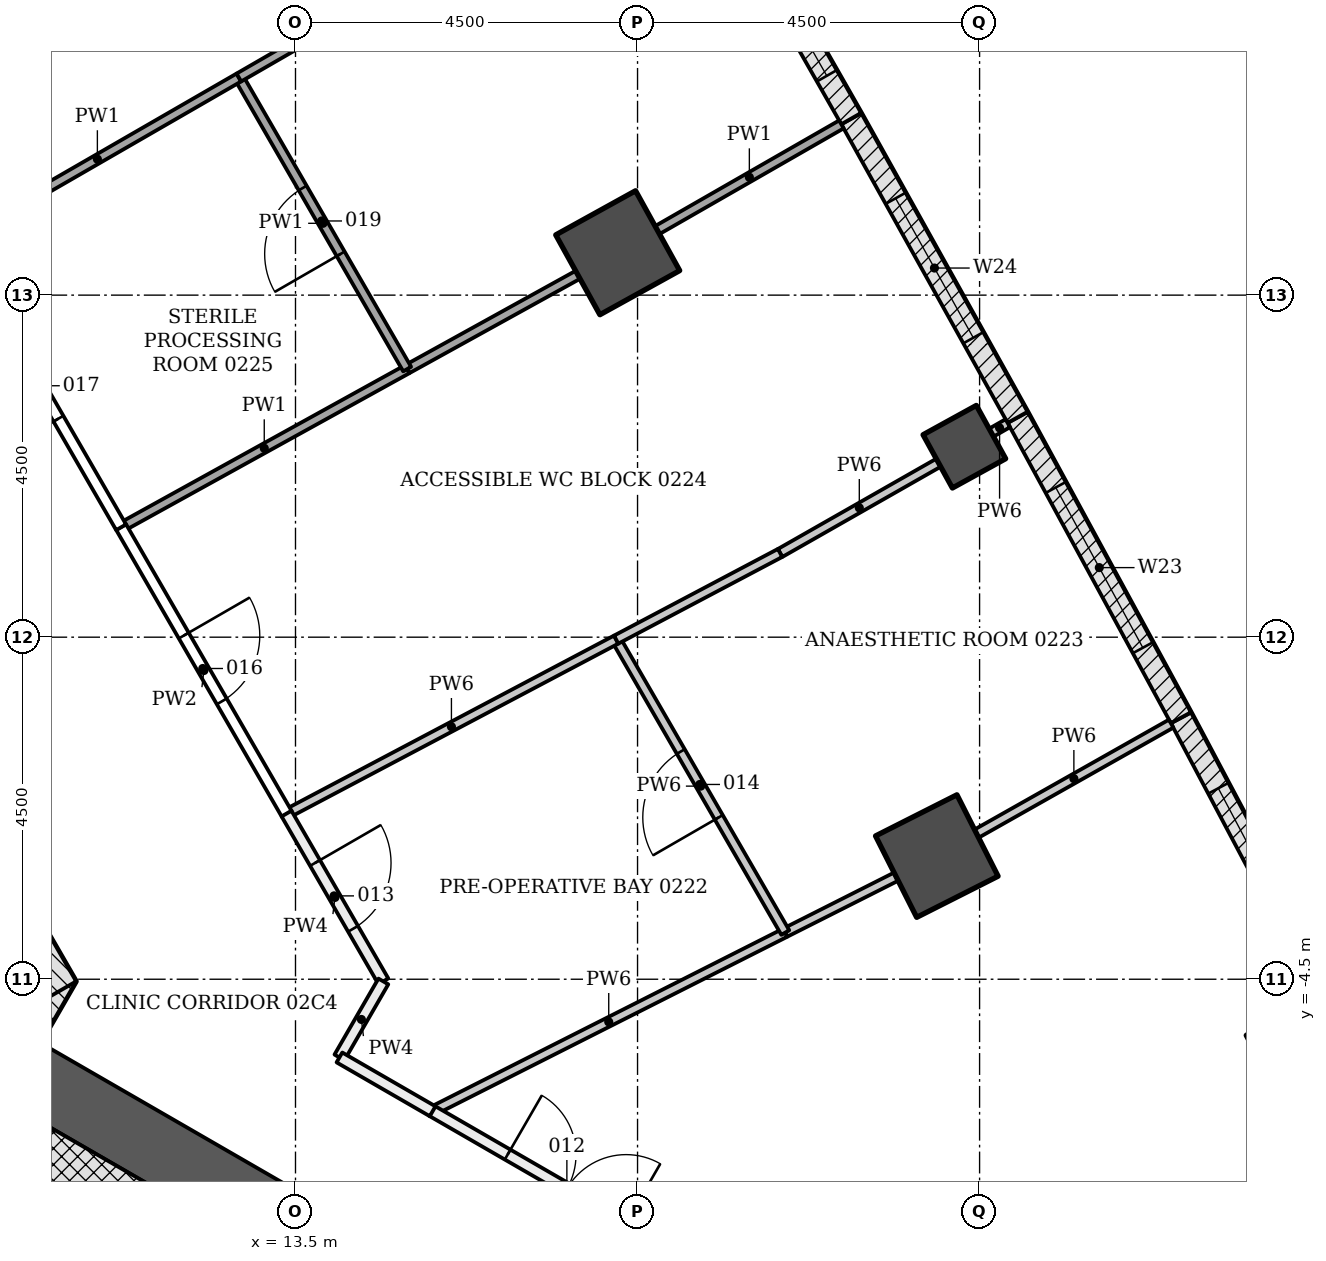
"""IFC4 building model, lengths in metres.
Left out: names, types, materials, properties, quantities, classifications, styles, units other than length and angle.
Written with IfcOpenShell. Run it as: python <this file> out.ifc"""

import sys

from ifc_helpers import new_model, si_unit, direction, frame, frame_2d, origin, origin_2d, place, context, subcontext, project, spatial, rectangle, extrude, element, fill, save


model = new_model("IFC4")
c1 = context("Model", 3, precision=1e-05, world=origin(), true_north=direction((0.0, 1.0)))
c2 = subcontext(c1, "Body", "Model", "MODEL_VIEW")
j1 = project(units=[si_unit("LENGTHUNIT", "METRE"), si_unit("PLANEANGLEUNIT", "RADIAN")], contexts=[c1])
p1 = place(None, origin())
s1 = spatial("IfcSite", under=j1, at=p1, CompositionType="ELEMENT")
p2 = place(p1, origin())
s2 = spatial("IfcBuilding", under=s1, at=p2, CompositionType="ELEMENT")
p3 = place(p2, frame((0.0, 0.0, 10.5)))
s3 = spatial("IfcBuildingStorey", under=s2, at=p3, CompositionType="ELEMENT", Elevation=10.5)
for number, where, z_axis, x_axis in (
    (1, (21.937, -2.88, -0.25), (0.0, 0.0, 1.0), (0.893, 0.451, 0.0)),
    (2, (17.739, 5.058, -0.25), (0.0, 0.0, 1.0), (0.875, 0.484, 0.0)),
):
    element("IfcColumn", number, at=place(p3, frame(where, z_axis=z_axis, x_axis=x_axis)), inside=s3, PredefinedType="COLUMN", context=c2, shape_type="SweptSolid", body=[
        extrude(rectangle(XDim=1.2, YDim=1.2, at=origin_2d()), origin(), (0.0, 0.0, 1.0), 4.5),
    ])
for number, where, z_axis, x_axis in (
    (3, (26.548, -5.406, -0.25), (0.0, 0.0, 1.0), (0.886, 0.464, 0.0)),
    (4, (22.3, 2.506, -0.25), (0.0, 0.0, 1.0), (0.876, 0.482, 0.0)),
):
    element("IfcColumn", number, at=place(p3, frame(where, z_axis=z_axis, x_axis=x_axis)), inside=s3, PredefinedType="COLUMN", context=c2, shape_type="SweptSolid", body=[
        extrude(rectangle(XDim=0.8, YDim=0.8, at=origin_2d()), origin(), (0.0, 0.0, 1.0), 4.5),
    ])
p4 = place(p3, frame((8.926, -6.753, -0.25), z_axis=(0.0, 0.0, 1.0), x_axis=(0.500042739161, 0.866000726912, 0.0)))
e5 = element("IfcWall", 5, at=p4, inside=s3, PredefinedType="SHEAR", context=c2, shape_type="SweptSolid", body=[
    extrude(rectangle(XDim=2.771, YDim=0.7, at=frame_2d((1.386, 0.0))), origin(), (0.0, 0.0, 1.0), 4.5),
])
p5 = place(p3, frame((10.311, -4.703, -0.25), z_axis=(0.0, 0.0, 1.0), x_axis=(-0.500001446645, 0.866024568562, 0.0)))
e6 = element("IfcWall", 6, at=p5, inside=s3, PredefinedType="SHEAR", context=c2, shape_type="SweptSolid", body=[
    extrude(rectangle(XDim=18.458, YDim=0.7, at=frame_2d((9.229, 0.0))), origin(), (0.0, 0.0, 1.0), 4.5),
])
p6 = place(p5, frame((8.7, 0.0, 0.25)))
e7 = element("IfcOpeningElement", 7, at=p6, cuts=e6, PredefinedType="OPENING", context=c2, shape_type="SweptSolid", body=[
    extrude(rectangle(XDim=1.0, YDim=2.1, at=frame_2d((0.5, 1.05))), frame((0.0, 0.36, 0.0), z_axis=(0.0, -1.0, 0.0), x_axis=(1.0, 0.0, 0.0)), (0.0, 0.0, 1.0), 0.72),
])
p7 = place(p5, frame((4.002, 0.0, 0.25)))
e8 = element("IfcOpeningElement", 8, at=p7, cuts=e6, PredefinedType="OPENING", context=c2, shape_type="SweptSolid", body=[
    extrude(rectangle(XDim=0.9, YDim=2.1, at=frame_2d((0.45, 1.05))), frame((0.0, 0.36, 0.0), z_axis=(0.0, -1.0, 0.0), x_axis=(1.0, 0.0, 0.0)), (0.0, 0.0, 1.0), 0.72),
])
p8 = place(p5, frame((14.093, 0.0, 0.25)))
e9 = element("IfcOpeningElement", 9, at=p8, cuts=e6, PredefinedType="OPENING", context=c2, shape_type="SweptSolid", body=[
    extrude(rectangle(XDim=0.9, YDim=2.1, at=frame_2d((0.45, 1.05))), frame((0.0, 0.36, 0.0), z_axis=(0.0, -1.0, 0.0), x_axis=(1.0, 0.0, 0.0)), (0.0, 0.0, 1.0), 0.72),
])
p9 = place(p3, frame((9.922, -5.728, -0.25), z_axis=(0.0, 0.0, 1.0), x_axis=(0.866028046028, -0.499995423472, 0.0)))
e10 = element("IfcWall", 10, at=p9, inside=s3, PredefinedType="SHEAR", context=c2, shape_type="SweptSolid", body=[
    extrude(rectangle(XDim=14.633, YDim=0.9, at=frame_2d((7.316, 0.0))), origin(), (0.0, 0.0, 1.0), 4.5),
])
p10 = place(p9, frame((7.35, 0.0, 0.25)))
e11 = element("IfcOpeningElement", 11, at=p10, cuts=e10, PredefinedType="OPENING", context=c2, shape_type="SweptSolid", body=[
    extrude(rectangle(XDim=1.5, YDim=2.1, at=frame_2d((0.75, 1.05))), frame((0.0, 0.46, 0.0), z_axis=(0.0, -1.0, 0.0), x_axis=(1.0, 0.0, 0.0)), (0.0, 0.0, 1.0), 0.92),
])
p11 = place(p3, frame((25.15, -1.062, 0.0), z_axis=(0.0, 0.0, 1.0), x_axis=(0.468566202388, -0.883428386447, 0.0)))
e12 = element("IfcWall", 12, at=p11, inside=s3, PredefinedType="NOTDEFINED", context=c2, shape_type="SweptSolid", body=[
    extrude(rectangle(XDim=4.496, YDim=0.3, at=frame_2d((2.248, 0.0))), origin(), (0.0, 0.0, 1.0), 4.25),
])
p12 = place(p11, frame((1.048, 0.0, 0.9)))
e13 = element("IfcOpeningElement", 13, at=p12, cuts=e12, PredefinedType="OPENING", context=c2, shape_type="SweptSolid", body=[
    extrude(rectangle(XDim=2.4, YDim=2.4, at=frame_2d((1.2, 1.2))), frame((0.0, 0.16, 0.0), z_axis=(0.0, -1.0, 0.0), x_axis=(1.0, 0.0, 0.0)), (0.0, 0.0, 1.0), 0.32),
])
p13 = place(p3, frame((23.001, 2.89, 0.0), z_axis=(0.0, 0.0, 1.0), x_axis=(0.477577109439, -0.878589838628, 0.0)))
e14 = element("IfcWall", 14, at=p13, inside=s3, PredefinedType="NOTDEFINED", context=c2, shape_type="SweptSolid", body=[
    extrude(rectangle(XDim=4.496, YDim=0.3, at=frame_2d((2.248, 0.0))), origin(), (0.0, 0.0, 1.0), 4.25),
])
p14 = place(p13, frame((1.048, 0.0, 0.9)))
e15 = element("IfcOpeningElement", 15, at=p14, cuts=e14, PredefinedType="OPENING", context=c2, shape_type="SweptSolid", body=[
    extrude(rectangle(XDim=2.4, YDim=2.4, at=frame_2d((1.2, 1.2))), frame((0.0, 0.16, 0.0), z_axis=(0.0, -1.0, 0.0), x_axis=(1.0, 0.0, 0.0)), (0.0, 0.0, 1.0), 0.32),
])
p15 = place(p3, frame((20.812, 6.82, 0.0), z_axis=(0.0, 0.0, 1.0), x_axis=(0.486606252415, -0.873621402617, 0.0)))
e16 = element("IfcWall", 16, at=p15, inside=s3, PredefinedType="NOTDEFINED", context=c2, shape_type="SweptSolid", body=[
    extrude(rectangle(XDim=4.496, YDim=0.3, at=frame_2d((2.248, 0.0))), origin(), (0.0, 0.0, 1.0), 4.25),
])
p16 = place(p15, frame((1.198, 0.0, 0.8)))
e17 = element("IfcOpeningElement", 17, at=p16, cuts=e16, PredefinedType="OPENING", context=c2, shape_type="SweptSolid", body=[
    extrude(rectangle(XDim=2.1, YDim=3.0, at=frame_2d((1.05, 1.5))), frame((0.0, 0.16, 0.0), z_axis=(0.0, -1.0, 0.0), x_axis=(1.0, 0.0, 0.0)), (0.0, 0.0, 1.0), 0.32),
])
p17 = place(p3, frame((18.583, 10.728, 0.0), z_axis=(0.0, 0.0, 1.0), x_axis=(0.495524760411, -0.868593812907, 0.0)))
e18 = element("IfcWall", 18, at=p17, inside=s3, PredefinedType="NOTDEFINED", context=c2, shape_type="SweptSolid", body=[
    extrude(rectangle(XDim=4.496, YDim=0.3, at=frame_2d((2.248, 0.0))), origin(), (0.0, 0.0, 1.0), 4.25),
])
p18 = place(p17, frame((0.648, 0.0, 0.8)))
e19 = element("IfcOpeningElement", 19, at=p18, cuts=e18, PredefinedType="OPENING", context=c2, shape_type="SweptSolid", body=[
    extrude(rectangle(XDim=3.2, YDim=2.7, at=frame_2d((1.6, 1.35))), frame((0.0, 0.16, 0.0), z_axis=(0.0, -1.0, 0.0), x_axis=(1.0, 0.0, 0.0)), (0.0, 0.0, 1.0), 0.32),
])
p19 = place(p3, frame((9.413, -6.61, -0.25), z_axis=(0.0, 0.0, 1.0), x_axis=(0.866018442252, -0.500012057535, 0.0)))
e20 = element("IfcWall", 20, at=p19, inside=s3, PredefinedType="SHEAR", context=c2, shape_type="SweptSolid", body=[
    extrude(rectangle(XDim=7.2, YDim=1.136, at=frame_2d((3.6, 0.0))), origin(), (0.0, 0.0, 1.0), 4.5),
])
p20 = place(p3, frame((19.942, -3.888, 0.0), z_axis=(0.0, 0.0, 1.0), x_axis=(-0.89239982182, -0.451245562877, 0.0)))
e21 = element("IfcWall", 21, at=p20, inside=s3, PredefinedType="PARTITIONING", context=c2, shape_type="SweptSolid", body=[
    extrude(rectangle(XDim=5.201, YDim=0.12, at=frame_2d((2.601, 0.0))), origin(), (0.0, 0.0, 1.0), 3.638),
])
p21 = place(p3, frame((21.401, -3.151, 0.0), z_axis=(0.0, 0.0, 1.0), x_axis=(-0.892653768212, -0.450742997834, 0.0)))
e22 = element("IfcWall", 22, at=p21, inside=s3, PredefinedType="PARTITIONING", context=c2, shape_type="SweptSolid", body=[
    extrude(rectangle(XDim=1.631, YDim=0.12, at=frame_2d((0.815, 0.0))), origin(), (0.0, 0.0, 1.0), 3.638),
])
p22 = place(p3, frame((25.02, -1.138, 0.0), z_axis=(0.0, 0.0, 1.0), x_axis=(-0.870620069476, -0.491955988505, 0.0)))
e23 = element("IfcWall", 23, at=p22, inside=s3, PredefinedType="PARTITIONING", context=c2, shape_type="SweptSolid", body=[
    extrude(rectangle(XDim=2.939, YDim=0.12, at=frame_2d((1.47, 0.0))), origin(), (0.0, 0.0, 1.0), 3.633),
])
p23 = place(p3, frame((15.295, -6.232, 0.0), z_axis=(0.0, 0.0, 1.0), x_axis=(0.865991915229, -0.500057999394, 0.0)))
e24 = element("IfcWall", 24, at=p23, inside=s3, PredefinedType="PARTITIONING", context=c2, shape_type="SweptSolid", body=[
    extrude(rectangle(XDim=4.094, YDim=0.15, at=frame_2d((2.047, 0.0))), origin(), (0.0, 0.0, 1.0), 3.638),
])
p24 = place(p23, frame((1.15, 0.0, 0.0)))
e25 = element("IfcOpeningElement", 25, at=p24, cuts=e24, PredefinedType="OPENING", context=c2, shape_type="SweptSolid", body=[
    extrude(rectangle(XDim=1.8, YDim=2.1, at=frame_2d((0.9, 1.05))), frame((0.0, 0.085, 0.0), z_axis=(0.0, -1.0, 0.0), x_axis=(1.0, 0.0, 0.0)), (0.0, 0.0, 1.0), 0.17),
])
p25 = place(p3, frame((19.944, -3.886, 0.0), z_axis=(0.0, 0.0, 1.0), x_axis=(-0.500092923031, 0.865971748, 0.0)))
e26 = element("IfcWall", 26, at=p25, inside=s3, PredefinedType="PARTITIONING", context=c2, shape_type="SweptSolid", body=[
    extrude(rectangle(XDim=4.449, YDim=0.12, at=frame_2d((2.225, 0.0))), origin(), (0.0, 0.0, 1.0), 3.638),
])
p26 = place(p25, frame((1.75, 0.0, 0.0)))
e27 = element("IfcOpeningElement", 27, at=p26, cuts=e26, PredefinedType="OPENING", context=c2, shape_type="SweptSolid", body=[
    extrude(rectangle(XDim=1.0, YDim=2.1, at=frame_2d((0.5, 1.05))), frame((0.0, 0.07, 0.0), z_axis=(0.0, -1.0, 0.0), x_axis=(1.0, 0.0, 0.0)), (0.0, 0.0, 1.0), 0.14),
])
p27 = place(p3, frame((17.719, -0.032, 0.0), z_axis=(0.0, 0.0, 1.0), x_axis=(-0.884039689759, -0.467411838672, 0.0)))
e28 = element("IfcWall", 28, at=p27, inside=s3, PredefinedType="PARTITIONING", context=c2, shape_type="SweptSolid", body=[
    extrude(rectangle(XDim=4.904, YDim=0.12, at=frame_2d((2.452, 0.0))), origin(), (0.0, 0.0, 1.0), 3.638),
])
p28 = place(p3, frame((13.382, -2.321, 0.0), z_axis=(0.0, 0.0, 1.0), x_axis=(0.500076401611, -0.8659812888, 0.0)))
e29 = element("IfcWall", 29, at=p28, inside=s3, PredefinedType="PARTITIONING", context=c2, shape_type="SweptSolid", body=[
    extrude(rectangle(XDim=2.547, YDim=0.15, at=frame_2d((1.274, 0.0))), origin(), (0.0, 0.0, 1.0), 3.638),
])
p29 = place(p28, frame((0.75, 0.0, 0.0)))
e30 = element("IfcOpeningElement", 30, at=p29, cuts=e29, PredefinedType="OPENING", context=c2, shape_type="SweptSolid", body=[
    extrude(rectangle(XDim=1.0, YDim=2.1, at=frame_2d((0.5, 1.05))), frame((0.0, 0.085, 0.0), z_axis=(0.0, -1.0, 0.0), x_axis=(1.0, 0.0, 0.0)), (0.0, 0.0, 1.0), 0.17),
])
p30 = place(p3, frame((14.656, -4.529, 0.0), z_axis=(0.0, 0.0, 1.0), x_axis=(-0.500502949238, -0.865734831114, 0.0)))
e31 = element("IfcWall", 31, at=p30, inside=s3, PredefinedType="PARTITIONING", context=c2, shape_type="SweptSolid", body=[
    extrude(rectangle(XDim=1.155, YDim=0.15, at=frame_2d((0.578, 0.0))), origin(), (0.0, 0.0, 1.0), 4.25),
])
p31 = place(p3, frame((14.078, -5.529, 0.0), z_axis=(0.0, 0.0, 1.0), x_axis=(0.865984561414, -0.500070734389, 0.0)))
e32 = element("IfcWall", 32, at=p31, inside=s3, PredefinedType="PARTITIONING", context=c2, shape_type="SweptSolid", body=[
    extrude(rectangle(XDim=1.416, YDim=0.15, at=frame_2d((0.708, 0.0))), origin(), (0.0, 0.0, 1.0), 3.638),
])
p32 = place(p3, frame((21.959, 2.295, 0.0), z_axis=(0.0, 0.0, 1.0), x_axis=(-0.868831589773, -0.49510773435, 0.0)))
e33 = element("IfcWall", 33, at=p32, inside=s3, PredefinedType="PARTITIONING", context=c2, shape_type="SweptSolid", body=[
    extrude(rectangle(XDim=2.397, YDim=0.12, at=frame_2d((1.199, 0.0))), origin(), (0.0, 0.0, 1.0), 3.638),
])
p33 = place(p3, frame((19.875, 1.108, 0.0), z_axis=(0.0, 0.0, 1.0), x_axis=(-0.884045895877, -0.467400100538, 0.0)))
e34 = element("IfcWall", 34, at=p33, inside=s3, PredefinedType="PARTITIONING", context=c2, shape_type="SweptSolid", body=[
    extrude(rectangle(XDim=2.439, YDim=0.12, at=frame_2d((1.219, 0.0))), origin(), (0.0, 0.0, 1.0), 3.638),
])
p34 = place(p3, frame((22.871, 2.815, 0.0), z_axis=(0.0, 0.0, 1.0), x_axis=(-0.867276603101, -0.497826569916, 0.0)))
e35 = element("IfcWall", 35, at=p34, inside=s3, PredefinedType="PARTITIONING", context=c2, shape_type="SweptSolid", body=[
    extrude(rectangle(XDim=0.249, YDim=0.12, at=frame_2d((0.125, 0.0))), origin(), (0.0, 0.0, 1.0), 4.25),
])
p35 = place(p3, frame((11.205, 1.45, 0.0), z_axis=(0.0, 0.0, 1.0), x_axis=(0.500058412813, -0.865991676505, 0.0)))
e36 = element("IfcWall", 36, at=p35, inside=s3, PredefinedType="PARTITIONING", context=c2, shape_type="SweptSolid", body=[
    extrude(rectangle(XDim=4.361, YDim=0.15, at=frame_2d((2.181, 0.0))), origin(), (0.0, 0.0, 1.0), 3.638),
])
p36 = place(p35, frame((1.65, 0.0, 0.0)))
e37 = element("IfcOpeningElement", 37, at=p36, cuts=e36, PredefinedType="OPENING", context=c2, shape_type="SweptSolid", body=[
    extrude(rectangle(XDim=1.0, YDim=2.1, at=frame_2d((0.5, 1.05))), frame((0.0, 0.085, 0.0), z_axis=(0.0, -1.0, 0.0), x_axis=(1.0, 0.0, 0.0)), (0.0, 0.0, 1.0), 0.17),
])
p37 = place(p3, frame((14.97, 3.526, 0.0), z_axis=(0.0, 0.0, 1.0), x_axis=(-0.875157368867, -0.483838381815, 0.0)))
e38 = element("IfcWall", 38, at=p37, inside=s3, PredefinedType="PARTITIONING", context=c2, shape_type="SweptSolid", body=[
    extrude(rectangle(XDim=4.299, YDim=0.12, at=frame_2d((2.149, 0.0))), origin(), (0.0, 0.0, 1.0), 3.638),
])
p38 = place(p3, frame((17.214, 4.767, 0.0), z_axis=(0.0, 0.0, 1.0), x_axis=(-0.875184225923, -0.483789800116, 0.0)))
e39 = element("IfcWall", 39, at=p38, inside=s3, PredefinedType="PARTITIONING", context=c2, shape_type="SweptSolid", body=[
    extrude(rectangle(XDim=2.563, YDim=0.12, at=frame_2d((1.281, 0.0))), origin(), (0.0, 0.0, 1.0), 3.638),
])
p39 = place(p3, frame((20.682, 6.746, 0.0), z_axis=(0.0, 0.0, 1.0), x_axis=(-0.867283853893, -0.49781393791, 0.0)))
e40 = element("IfcWall", 40, at=p39, inside=s3, PredefinedType="PARTITIONING", context=c2, shape_type="SweptSolid", body=[
    extrude(rectangle(XDim=2.792, YDim=0.12, at=frame_2d((1.396, 0.0))), origin(), (0.0, 0.0, 1.0), 3.633),
])
p40 = place(p3, frame((11.206, 1.446, 0.0), z_axis=(0.0, 0.0, 1.0), x_axis=(-0.500044734646, 0.865999574684, 0.0)))
e41 = element("IfcWall", 41, at=p40, inside=s3, PredefinedType="PARTITIONING", context=c2, shape_type="SweptSolid", body=[
    extrude(rectangle(XDim=4.35, YDim=0.15, at=frame_2d((2.175, 0.0))), origin(), (0.0, 0.0, 1.0), 3.638),
])
p41 = place(p40, frame((1.65, 0.0, 0.0)))
e42 = element("IfcOpeningElement", 42, at=p41, cuts=e41, PredefinedType="OPENING", context=c2, shape_type="SweptSolid", body=[
    extrude(rectangle(XDim=1.0, YDim=2.1, at=frame_2d((0.5, 1.05))), frame((0.0, 0.085, 0.0), z_axis=(0.0, -1.0, 0.0), x_axis=(1.0, 0.0, 0.0)), (0.0, 0.0, 1.0), 0.17),
])
p42 = place(p3, frame((14.969, 3.527, 0.0), z_axis=(0.0, 0.0, 1.0), x_axis=(-0.499903777033, 0.866080951013, 0.0)))
e43 = element("IfcWall", 43, at=p42, inside=s3, PredefinedType="PARTITIONING", context=c2, shape_type="SweptSolid", body=[
    extrude(rectangle(XDim=4.429, YDim=0.12, at=frame_2d((2.214, 0.0))), origin(), (0.0, 0.0, 1.0), 3.638),
])
p43 = place(p42, frame((1.75, 0.0, 0.0)))
e44 = element("IfcOpeningElement", 44, at=p43, cuts=e43, PredefinedType="OPENING", context=c2, shape_type="SweptSolid", body=[
    extrude(rectangle(XDim=1.0, YDim=2.1, at=frame_2d((0.5, 1.05))), frame((0.0, 0.07, 0.0), z_axis=(0.0, -1.0, 0.0), x_axis=(1.0, 0.0, 0.0)), (0.0, 0.0, 1.0), 0.14),
])
p44 = place(p3, frame((12.755, 7.363, 0.0), z_axis=(0.0, 0.0, 1.0), x_axis=(-0.866173292352, -0.499743761959, 0.0)))
e45 = element("IfcWall", 45, at=p44, inside=s3, PredefinedType="PARTITIONING", context=c2, shape_type="SweptSolid", body=[
    extrude(rectangle(XDim=4.298, YDim=0.12, at=frame_2d((2.149, 0.0))), origin(), (0.0, 0.0, 1.0), 3.638),
])
p45 = place(p3, frame((14.4, 8.313, 0.0), z_axis=(0.0, 0.0, 1.0), x_axis=(-0.865980106173, -0.500078449558, 0.0)))
e46 = element("IfcWall", 46, at=p45, inside=s3, PredefinedType="PARTITIONING", context=c2, shape_type="SweptSolid", body=[
    extrude(rectangle(XDim=1.9, YDim=0.12, at=frame_2d((0.95, 0.0))), origin(), (0.0, 0.0, 1.0), 3.638),
])
p46 = place(p12, origin())
e47 = element("IfcWindow", 47, at=p46, inside=s3, PartitioningType="DOUBLE_PANEL_VERTICAL", PredefinedType="WINDOW", context=c2, shape_type="SweptSolid", body=[
    extrude(rectangle(XDim=2.4, YDim=2.4, at=frame_2d((1.2, 1.2))), frame((0.0, 0.03, 0.0), z_axis=(0.0, -1.0, 0.0), x_axis=(1.0, 0.0, 0.0)), (0.0, 0.0, 1.0), 0.06),
])
fill(e13, e47)
p47 = place(p14, origin())
e48 = element("IfcWindow", 48, at=p47, inside=s3, PartitioningType="DOUBLE_PANEL_VERTICAL", PredefinedType="WINDOW", context=c2, shape_type="SweptSolid", body=[
    extrude(rectangle(XDim=2.4, YDim=2.4, at=frame_2d((1.2, 1.2))), frame((0.0, 0.03, 0.0), z_axis=(0.0, -1.0, 0.0), x_axis=(1.0, 0.0, 0.0)), (0.0, 0.0, 1.0), 0.06),
])
fill(e15, e48)
p48 = place(p16, origin())
e49 = element("IfcWindow", 49, at=p48, inside=s3, PartitioningType="DOUBLE_PANEL_HORIZONTAL", PredefinedType="WINDOW", context=c2, shape_type="SweptSolid", body=[
    extrude(rectangle(XDim=2.1, YDim=3.0, at=frame_2d((1.05, 1.5))), frame((0.0, 0.03, 0.0), z_axis=(0.0, -1.0, 0.0), x_axis=(1.0, 0.0, 0.0)), (0.0, 0.0, 1.0), 0.06),
])
fill(e17, e49)
p49 = place(p18, origin())
e50 = element("IfcWindow", 50, at=p49, inside=s3, PartitioningType="TRIPLE_PANEL_VERTICAL", PredefinedType="WINDOW", context=c2, shape_type="SweptSolid", body=[
    extrude(rectangle(XDim=3.2, YDim=2.7, at=frame_2d((1.6, 1.35))), frame((0.0, 0.03, 0.0), z_axis=(0.0, -1.0, 0.0), x_axis=(1.0, 0.0, 0.0)), (0.0, 0.0, 1.0), 0.06),
])
fill(e19, e50)
p50 = place(p24, origin())
e51 = element("IfcDoor", 51, at=p50, inside=s3, OperationType="DOUBLE_DOOR_SINGLE_SWING", PredefinedType="DOOR", context=c2, shape_type="SweptSolid", body=[
    extrude(rectangle(XDim=1.8, YDim=2.1, at=frame_2d((0.9, 1.05))), frame((0.0, 0.025, 0.0), z_axis=(0.0, -1.0, 0.0), x_axis=(1.0, 0.0, 0.0)), (0.0, 0.0, 1.0), 0.05),
])
fill(e25, e51)
p51 = place(p29, origin())
e52 = element("IfcDoor", 52, at=p51, inside=s3, OperationType="SINGLE_SWING_LEFT", PredefinedType="DOOR", context=c2, shape_type="SweptSolid", body=[
    extrude(rectangle(XDim=1.0, YDim=2.1, at=frame_2d((0.5, 1.05))), frame((0.0, 0.025, 0.0), z_axis=(0.0, -1.0, 0.0), x_axis=(1.0, 0.0, 0.0)), (0.0, 0.0, 1.0), 0.05),
])
fill(e30, e52)
p52 = place(p26, origin())
e53 = element("IfcDoor", 53, at=p52, inside=s3, OperationType="SINGLE_SWING_LEFT", PredefinedType="DOOR", context=c2, shape_type="SweptSolid", body=[
    extrude(rectangle(XDim=1.0, YDim=2.1, at=frame_2d((0.5, 1.05))), frame((0.0, 0.025, 0.0), z_axis=(0.0, -1.0, 0.0), x_axis=(1.0, 0.0, 0.0)), (0.0, 0.0, 1.0), 0.05),
])
fill(e27, e53)
p53 = place(p36, origin())
e54 = element("IfcDoor", 54, at=p53, inside=s3, OperationType="SINGLE_SWING_LEFT", PredefinedType="DOOR", context=c2, shape_type="SweptSolid", body=[
    extrude(rectangle(XDim=1.0, YDim=2.1, at=frame_2d((0.5, 1.05))), frame((0.0, 0.025, 0.0), z_axis=(0.0, -1.0, 0.0), x_axis=(1.0, 0.0, 0.0)), (0.0, 0.0, 1.0), 0.05),
])
fill(e37, e54)
p54 = place(p41, origin())
e55 = element("IfcDoor", 55, at=p54, inside=s3, OperationType="SINGLE_SWING_RIGHT", PredefinedType="DOOR", context=c2, shape_type="SweptSolid", body=[
    extrude(rectangle(XDim=1.0, YDim=2.1, at=frame_2d((0.5, 1.05))), frame((0.0, 0.025, 0.0), z_axis=(0.0, -1.0, 0.0), x_axis=(1.0, 0.0, 0.0)), (0.0, 0.0, 1.0), 0.05),
])
fill(e42, e55)
p55 = place(p43, origin())
e56 = element("IfcDoor", 56, at=p55, inside=s3, OperationType="SINGLE_SWING_LEFT", PredefinedType="DOOR", context=c2, shape_type="SweptSolid", body=[
    extrude(rectangle(XDim=1.0, YDim=2.1, at=frame_2d((0.5, 1.05))), frame((0.0, 0.025, 0.0), z_axis=(0.0, -1.0, 0.0), x_axis=(1.0, 0.0, 0.0)), (0.0, 0.0, 1.0), 0.05),
])
fill(e44, e56)
save(model, sys.argv[1])
